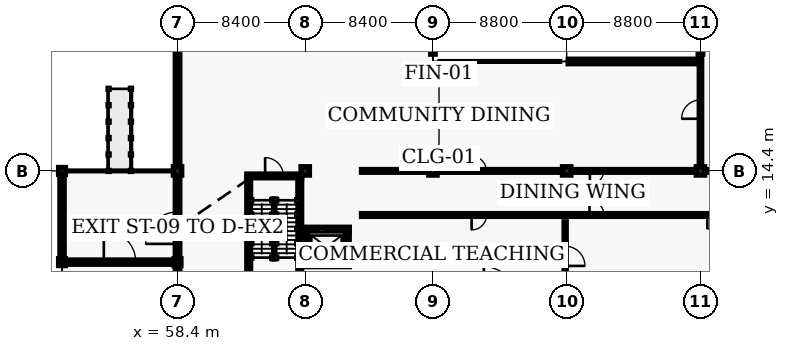
"""IFC4 building model, lengths in metres.
Left out: names, types, materials, properties, quantities, classifications, styles, units other than length and angle.
Written with IfcOpenShell. Run it as: python <this file> out.ifc"""

import sys

from ifc_helpers import new_model, si_unit, direction, frame, frame_2d, origin, origin_2d, place, context, subcontext, project, spatial, rectangle, extrude, element, fill, save


model = new_model("IFC4")
c1 = context("Model", 3, precision=1e-05, world=origin(), true_north=direction((0.0, 1.0)))
c2 = subcontext(c1, "Body", "Model", "MODEL_VIEW")
j1 = project(units=[si_unit("LENGTHUNIT", "METRE"), si_unit("PLANEANGLEUNIT", "RADIAN")], contexts=[c1])
p1 = place(None, origin())
s1 = spatial("IfcSite", under=j1, at=p1, CompositionType="ELEMENT")
p2 = place(p1, origin())
s2 = spatial("IfcBuilding", under=s1, at=p2, CompositionType="ELEMENT")
p3 = place(p2, origin())
s3 = spatial("IfcBuildingStorey", under=s2, at=p3, CompositionType="ELEMENT", Elevation=0.0)
for number, where, z_axis, x_axis in (
    (1, (58.4, 14.4, 0.0), (0.0, 0.0, 1.0), (1.0, 0.0, 0.0)),
    (2, (66.8, 14.4, 0.0), (0.0, 0.0, 1.0), (1.0, 0.0, 0.0)),
    (3, (75.2, 14.4, 0.0), (0.0, 0.0, 1.0), (1.0, 0.0, 0.0)),
    (4, (84.0, 14.4, 0.0), (0.0, 0.0, 1.0), (1.0, 0.0, 0.0)),
    (5, (92.8, 14.4, 0.0), (0.0, 0.0, 1.0), (1.0, 0.0, 0.0)),
):
    element("IfcColumn", number, at=place(p3, frame(where, z_axis=z_axis, x_axis=x_axis)), inside=s3, PredefinedType="COLUMN", context=c2, shape_type="SweptSolid", body=[
        extrude(rectangle(XDim=0.55, YDim=0.55, at=origin_2d()), origin(), (0.0, 0.0, 1.0), 4.8),
    ])
for number, where, z_axis, x_axis in (
    (6, (50.8, 8.4, 0.0), (0.0, 0.0, 1.0), (1.0, 0.0, 0.0)),
    (7, (50.8, 14.4, 0.0), (0.0, 0.0, 1.0), (1.0, 0.0, 0.0)),
    (8, (58.4, 8.4, 0.0), (0.0, 0.0, 1.0), (1.0, 0.0, 0.0)),
):
    element("IfcColumn", number, at=place(p3, frame(where, z_axis=z_axis, x_axis=x_axis)), inside=s3, PredefinedType="COLUMN", context=c2, shape_type="SweptSolid", body=[
        extrude(rectangle(XDim=0.45, YDim=0.45, at=origin_2d()), origin(), (0.0, 0.0, 1.0), 4.8),
    ])
p4 = place(p3, frame((84.1, 21.6, 0.0), z_axis=(0.0, 0.0, 1.0), x_axis=(1.0, 0.0, 0.0)))
e9 = element("IfcWall", 9, at=p4, inside=s3, PredefinedType="SOLIDWALL", context=c2, shape_type="SweptSolid", body=[
    extrude(rectangle(XDim=8.6, YDim=0.3, at=frame_2d((4.3, 0.0))), origin(), (0.0, 0.0, 1.0), 4.35),
])
p5 = place(p4, frame((3.1, 0.0, 0.9)))
e10 = element("IfcOpeningElement", 10, at=p5, cuts=e9, PredefinedType="OPENING", context=c2, shape_type="SweptSolid", body=[
    extrude(rectangle(XDim=2.4, YDim=2.1, at=frame_2d((1.2, 1.05))), frame((0.0, 0.16, 0.0), z_axis=(0.0, -1.0, 0.0), x_axis=(1.0, 0.0, 0.0)), (0.0, 0.0, 1.0), 0.32),
])
p6 = place(p3, frame((58.4, 6.1, 0.0), z_axis=(0.0, 0.0, 1.0), x_axis=(0.0, 1.0, 0.0)))
e11 = element("IfcWall", 11, at=p6, inside=s3, PredefinedType="SOLIDWALL", context=c2, shape_type="SweptSolid", body=[
    extrude(rectangle(XDim=8.2, YDim=0.3, at=frame_2d((4.1, 0.0))), origin(), (0.0, 0.0, 1.0), 4.095),
])
p7 = place(p6, frame((3.5, 0.0, 0.0)))
e12 = element("IfcOpeningElement", 12, at=p7, cuts=e11, PredefinedType="OPENING", context=c2, shape_type="SweptSolid", body=[
    extrude(rectangle(XDim=2.1, YDim=2.35, at=frame_2d((1.05, 1.175))), frame((0.0, 0.16, 0.0), z_axis=(0.0, -1.0, 0.0), x_axis=(1.0, 0.0, 0.0)), (0.0, 0.0, 1.0), 0.32),
])
p8 = place(p3, frame((58.4, 14.5, 0.0), z_axis=(0.0, 0.0, 1.0), x_axis=(0.0, 1.0, 0.0)))
e13 = element("IfcWall", 13, at=p8, inside=s3, PredefinedType="SOLIDWALL", context=c2, shape_type="SweptSolid", body=[
    extrude(rectangle(XDim=8.2, YDim=0.3, at=frame_2d((4.1, 0.0))), origin(), (0.0, 0.0, 1.0), 4.095),
])
p9 = place(p3, frame((50.95, 8.4, 0.0), z_axis=(0.0, 0.0, 1.0), x_axis=(1.0, 0.0, 0.0)))
e14 = element("IfcWall", 14, at=p9, inside=s3, PredefinedType="SOLIDWALL", context=c2, shape_type="SweptSolid", body=[
    extrude(rectangle(XDim=7.3, YDim=0.28, at=frame_2d((3.65, 0.0))), origin(), (0.0, 0.0, 1.0), 4.187),
])
p10 = place(p9, frame((2.6, 0.0, 0.0)))
e15 = element("IfcOpeningElement", 15, at=p10, cuts=e14, PredefinedType="OPENING", context=c2, shape_type="SweptSolid", body=[
    extrude(rectangle(XDim=2.1, YDim=2.35, at=frame_2d((1.05, 1.175))), frame((0.0, 0.15, 0.0), z_axis=(0.0, -1.0, 0.0), x_axis=(1.0, 0.0, 0.0)), (0.0, 0.0, 1.0), 0.3),
])
p11 = place(p3, frame((50.8, 8.45, 0.0), z_axis=(0.0, 0.0, 1.0), x_axis=(0.0, 1.0, 0.0)))
e16 = element("IfcWall", 16, at=p11, inside=s3, PredefinedType="SOLIDWALL", context=c2, shape_type="SweptSolid", body=[
    extrude(rectangle(XDim=5.8, YDim=0.28, at=frame_2d((2.9, 0.0))), origin(), (0.0, 0.0, 1.0), 4.135),
])
for number, where, z_axis, x_axis in (
    (17, (75.2, 22.08, 0.0), (0.0, 0.0, 1.0), (0.0, 1.0, 0.0)),
    (18, (92.8, 22.08, 0.0), (0.0, 0.0, 1.0), (0.0, 1.0, 0.0)),
):
    element("IfcWall", number, at=place(p3, frame(where, z_axis=z_axis, x_axis=x_axis)), inside=s3, PredefinedType="SOLIDWALL", context=c2, shape_type="SweptSolid", body=[
        extrude(rectangle(XDim=0.77, YDim=0.3, at=frame_2d((0.385, 0.0))), origin(), (0.0, 0.0, 1.0), 3.845),
    ])
p12 = place(p3, frame((62.955, 14.07, 0.0), z_axis=(0.0, 0.0, 1.0), x_axis=(1.0, 0.0, 0.0)))
e19 = element("IfcWall", 19, at=p12, inside=s3, PredefinedType="SHEAR", context=c2, shape_type="SweptSolid", body=[
    extrude(rectangle(XDim=3.61, YDim=0.25, at=frame_2d((1.805, 0.0))), origin(), (0.0, 0.0, 1.0), 4.56),
])
p13 = place(p12, frame((1.205, 0.0, 0.0)))
e20 = element("IfcOpeningElement", 20, at=p13, cuts=e19, PredefinedType="OPENING", context=c2, shape_type="SweptSolid", body=[
    extrude(rectangle(XDim=1.2, YDim=2.15, at=frame_2d((0.6, 1.075))), frame((0.0, 0.135, 0.0), z_axis=(0.0, -1.0, 0.0), x_axis=(1.0, 0.0, 0.0)), (0.0, 0.0, 1.0), 0.27),
])
for number, where, z_axis, x_axis in (
    (21, (66.44, 13.945, 0.0), (0.0, 0.0, 1.0), (0.0, -1.0, 0.0)),
    (22, (63.08, 6.555, 0.0), (0.0, 0.0, 1.0), (0.0, 1.0, 0.0)),
):
    element("IfcWall", number, at=place(p3, frame(where, z_axis=z_axis, x_axis=x_axis)), inside=s3, PredefinedType="SHEAR", context=c2, shape_type="SweptSolid", body=[
        extrude(rectangle(XDim=7.39, YDim=0.25, at=frame_2d((3.695, 0.0))), origin(), (0.0, 0.0, 1.0), 4.56),
    ])
p14 = place(p3, frame((66.7, 8.23, 0.0), z_axis=(0.0, 0.0, 1.0), x_axis=(1.0, 0.0, 0.0)))
e23 = element("IfcWall", 23, at=p14, inside=s3, PredefinedType="SHEAR", context=c2, shape_type="SweptSolid", body=[
    extrude(rectangle(XDim=3.0, YDim=0.25, at=frame_2d((1.5, 0.0))), origin(), (0.0, 0.0, 1.0), 4.56),
])
p15 = place(p3, frame((69.7, 10.57, 0.0), z_axis=(0.0, 0.0, 1.0), x_axis=(-1.0, 0.0, 0.0)))
e24 = element("IfcWall", 24, at=p15, inside=s3, PredefinedType="SHEAR", context=c2, shape_type="SweptSolid", body=[
    extrude(rectangle(XDim=3.0, YDim=0.25, at=frame_2d((1.5, 0.0))), origin(), (0.0, 0.0, 1.0), 4.56),
])
p16 = place(p15, frame((0.95, 0.0, 0.0)))
e25 = element("IfcOpeningElement", 25, at=p16, cuts=e24, PredefinedType="OPENING", context=c2, shape_type="SweptSolid", body=[
    extrude(rectangle(XDim=1.1, YDim=2.15, at=frame_2d((0.55, 1.075))), frame((0.0, 0.135, 0.0), z_axis=(0.0, -1.0, 0.0), x_axis=(1.0, 0.0, 0.0)), (0.0, 0.0, 1.0), 0.27),
])
for number, where, z_axis, x_axis in (
    (26, (69.57, 8.36, 0.0), (0.0, 0.0, 1.0), (0.0, 1.0, 0.0)),
    (27, (66.83, 10.44, 0.0), (0.0, 0.0, 1.0), (0.0, -1.0, 0.0)),
):
    element("IfcWall", number, at=place(p3, frame(where, z_axis=z_axis, x_axis=x_axis)), inside=s3, PredefinedType="SHEAR", context=c2, shape_type="SweptSolid", body=[
        extrude(rectangle(XDim=2.08, YDim=0.25, at=frame_2d((1.04, 0.0))), origin(), (0.0, 0.0, 1.0), 4.56),
    ])
p17 = place(p3, frame((70.5, 11.5, 0.0), z_axis=(0.0, 0.0, 1.0), x_axis=(1.0, 0.0, 0.0)))
e28 = element("IfcWall", 28, at=p17, inside=s3, PredefinedType="PARTITIONING", context=c2, shape_type="SweptSolid", body=[
    extrude(rectangle(XDim=30.95, YDim=0.18, at=frame_2d((15.475, 0.0))), origin(), (0.0, 0.0, 1.0), 3.845),
])
p18 = place(p17, frame((7.247, 0.0, 0.0)))
e29 = element("IfcOpeningElement", 29, at=p18, cuts=e28, PredefinedType="OPENING", context=c2, shape_type="SweptSolid", body=[
    extrude(rectangle(XDim=0.98, YDim=2.12, at=frame_2d((0.49, 1.06))), frame((0.0, 0.1, 0.0), z_axis=(0.0, -1.0, 0.0), x_axis=(1.0, 0.0, 0.0)), (0.0, 0.0, 1.0), 0.2),
])
p19 = place(p17, frame((15.0, 0.0, 0.0)))
e30 = element("IfcOpeningElement", 30, at=p19, cuts=e28, PredefinedType="OPENING", context=c2, shape_type="SweptSolid", body=[
    extrude(rectangle(XDim=0.95, YDim=2.12, at=frame_2d((0.475, 1.06))), frame((0.0, 0.1, 0.0), z_axis=(0.0, -1.0, 0.0), x_axis=(1.0, 0.0, 0.0)), (0.0, 0.0, 1.0), 0.2),
])
p20 = place(p17, frame((22.753, 0.0, 0.0)))
e31 = element("IfcOpeningElement", 31, at=p20, cuts=e28, PredefinedType="OPENING", context=c2, shape_type="SweptSolid", body=[
    extrude(rectangle(XDim=0.92, YDim=2.1, at=frame_2d((0.46, 1.05))), frame((0.0, 0.1, 0.0), z_axis=(0.0, -1.0, 0.0), x_axis=(1.0, 0.0, 0.0)), (0.0, 0.0, 1.0), 0.2),
])
p21 = place(p17, frame((27.292, 0.0, 0.0)))
e32 = element("IfcOpeningElement", 32, at=p21, cuts=e28, PredefinedType="OPENING", context=c2, shape_type="SweptSolid", body=[
    extrude(rectangle(XDim=0.9, YDim=2.06, at=frame_2d((0.45, 1.03))), frame((0.0, 0.1, 0.0), z_axis=(0.0, -1.0, 0.0), x_axis=(1.0, 0.0, 0.0)), (0.0, 0.0, 1.0), 0.2),
])
p22 = place(p3, frame((70.5, 14.4, 0.0), z_axis=(0.0, 0.0, 1.0), x_axis=(1.0, 0.0, 0.0)))
e33 = element("IfcWall", 33, at=p22, inside=s3, PredefinedType="PARTITIONING", context=c2, shape_type="SweptSolid", body=[
    extrude(rectangle(XDim=30.95, YDim=0.18, at=frame_2d((15.475, 0.0))), origin(), (0.0, 0.0, 1.0), 3.795),
])
p23 = place(p22, frame((7.257, 0.0, 0.0)))
e34 = element("IfcOpeningElement", 34, at=p23, cuts=e33, PredefinedType="OPENING", context=c2, shape_type="SweptSolid", body=[
    extrude(rectangle(XDim=0.96, YDim=2.08, at=frame_2d((0.48, 1.04))), frame((0.0, 0.1, 0.0), z_axis=(0.0, -1.0, 0.0), x_axis=(1.0, 0.0, 0.0)), (0.0, 0.0, 1.0), 0.2),
])
p24 = place(p22, frame((15.025, 0.0, 0.0)))
e35 = element("IfcOpeningElement", 35, at=p24, cuts=e33, PredefinedType="OPENING", context=c2, shape_type="SweptSolid", body=[
    extrude(rectangle(XDim=0.9, YDim=2.06, at=frame_2d((0.45, 1.03))), frame((0.0, 0.1, 0.0), z_axis=(0.0, -1.0, 0.0), x_axis=(1.0, 0.0, 0.0)), (0.0, 0.0, 1.0), 0.2),
])
p25 = place(p22, frame((23.523, 0.0, 0.0)))
e36 = element("IfcOpeningElement", 36, at=p25, cuts=e33, PredefinedType="OPENING", context=c2, shape_type="SweptSolid", body=[
    extrude(rectangle(XDim=1.18, YDim=2.18, at=frame_2d((0.59, 1.09))), frame((0.0, 0.1, 0.0), z_axis=(0.0, -1.0, 0.0), x_axis=(1.0, 0.0, 0.0)), (0.0, 0.0, 1.0), 0.2),
])
p26 = place(p3, frame((83.9, 6.55, 0.0), z_axis=(0.0, 0.0, 1.0), x_axis=(0.0, 1.0, 0.0)))
e37 = element("IfcWall", 37, at=p26, inside=s3, PredefinedType="PARTITIONING", context=c2, shape_type="SweptSolid", body=[
    extrude(rectangle(XDim=4.5, YDim=0.14, at=frame_2d((2.25, 0.0))), origin(), (0.0, 0.0, 1.0), 3.845),
])
p27 = place(p26, frame((1.6, 0.0, 0.0)))
e38 = element("IfcOpeningElement", 38, at=p27, cuts=e37, PredefinedType="OPENING", context=c2, shape_type="SweptSolid", body=[
    extrude(rectangle(XDim=1.3, YDim=2.2, at=frame_2d((0.65, 1.1))), frame((0.0, 0.08, 0.0), z_axis=(0.0, -1.0, 0.0), x_axis=(1.0, 0.0, 0.0)), (0.0, 0.0, 1.0), 0.16),
])
p28 = place(p3, frame((92.8, 14.85, 0.0), z_axis=(0.0, 0.0, 1.0), x_axis=(0.0, 1.0, 0.0)))
e39 = element("IfcWall", 39, at=p28, inside=s3, PredefinedType="PARTITIONING", context=c2, shape_type="SweptSolid", body=[
    extrude(rectangle(XDim=7.2, YDim=0.16, at=frame_2d((3.6, 0.0))), origin(), (0.0, 0.0, 1.0), 3.845),
])
p29 = place(p28, frame((2.98, 0.0, 0.0)))
e40 = element("IfcOpeningElement", 40, at=p29, cuts=e39, PredefinedType="OPENING", context=c2, shape_type="SweptSolid", body=[
    extrude(rectangle(XDim=1.24, YDim=2.2, at=frame_2d((0.62, 1.1))), frame((0.0, 0.09, 0.0), z_axis=(0.0, -1.0, 0.0), x_axis=(1.0, 0.0, 0.0)), (0.0, 0.0, 1.0), 0.18),
])
p30 = place(p5, origin())
e41 = element("IfcWindow", 41, at=p30, inside=s3, PartitioningType="SINGLE_PANEL", PredefinedType="WINDOW", context=c2, shape_type="SweptSolid", body=[
    extrude(rectangle(XDim=2.4, YDim=2.1, at=frame_2d((1.2, 1.05))), frame((0.0, 0.03, 0.0), z_axis=(0.0, -1.0, 0.0), x_axis=(1.0, 0.0, 0.0)), (0.0, 0.0, 1.0), 0.06),
])
fill(e10, e41)
p31 = place(p13, origin())
e42 = element("IfcDoor", 42, at=p31, inside=s3, OperationType="SINGLE_SWING_LEFT", PredefinedType="DOOR", context=c2, shape_type="SweptSolid", body=[
    extrude(rectangle(XDim=1.2, YDim=2.15, at=frame_2d((0.6, 1.075))), frame((0.0, 0.025, 0.0), z_axis=(0.0, -1.0, 0.0), x_axis=(1.0, 0.0, 0.0)), (0.0, 0.0, 1.0), 0.05),
])
fill(e20, e42)
p32 = place(p16, origin())
e43 = element("IfcDoor", 43, at=p32, inside=s3, OperationType="SLIDING_TO_LEFT", PredefinedType="DOOR", context=c2, shape_type="SweptSolid", body=[
    extrude(rectangle(XDim=1.1, YDim=2.15, at=frame_2d((0.55, 1.075))), frame((0.0, 0.025, 0.0), z_axis=(0.0, -1.0, 0.0), x_axis=(1.0, 0.0, 0.0)), (0.0, 0.0, 1.0), 0.05),
])
fill(e25, e43)
p33 = place(p7, origin())
e44 = element("IfcDoor", 44, at=p33, inside=s3, OperationType="DOUBLE_DOOR_SINGLE_SWING", PredefinedType="DOOR", context=c2, shape_type="SweptSolid", body=[
    extrude(rectangle(XDim=2.1, YDim=2.35, at=frame_2d((1.05, 1.175))), frame((0.0, 0.025, 0.0), z_axis=(0.0, -1.0, 0.0), x_axis=(1.0, 0.0, 0.0)), (0.0, 0.0, 1.0), 0.05),
])
fill(e12, e44)
p34 = place(p10, origin())
e45 = element("IfcDoor", 45, at=p34, inside=s3, OperationType="DOUBLE_DOOR_SINGLE_SWING", PredefinedType="DOOR", context=c2, shape_type="SweptSolid", body=[
    extrude(rectangle(XDim=2.1, YDim=2.35, at=frame_2d((1.05, 1.175))), frame((0.0, 0.025, 0.0), z_axis=(0.0, -1.0, 0.0), x_axis=(1.0, 0.0, 0.0)), (0.0, 0.0, 1.0), 0.05),
])
fill(e15, e45)
p35 = place(p18, origin())
e46 = element("IfcDoor", 46, at=p35, inside=s3, OperationType="SINGLE_SWING_RIGHT", PredefinedType="DOOR", context=c2, shape_type="SweptSolid", body=[
    extrude(rectangle(XDim=0.98, YDim=2.12, at=frame_2d((0.49, 1.06))), frame((0.0, 0.025, 0.0), z_axis=(0.0, -1.0, 0.0), x_axis=(1.0, 0.0, 0.0)), (0.0, 0.0, 1.0), 0.05),
])
fill(e29, e46)
p36 = place(p19, origin())
e47 = element("IfcDoor", 47, at=p36, inside=s3, OperationType="SINGLE_SWING_LEFT", PredefinedType="DOOR", context=c2, shape_type="SweptSolid", body=[
    extrude(rectangle(XDim=0.95, YDim=2.12, at=frame_2d((0.475, 1.06))), frame((0.0, 0.025, 0.0), z_axis=(0.0, -1.0, 0.0), x_axis=(1.0, 0.0, 0.0)), (0.0, 0.0, 1.0), 0.05),
])
fill(e30, e47)
p37 = place(p20, origin())
e48 = element("IfcDoor", 48, at=p37, inside=s3, OperationType="SINGLE_SWING_RIGHT", PredefinedType="DOOR", context=c2, shape_type="SweptSolid", body=[
    extrude(rectangle(XDim=0.92, YDim=2.1, at=frame_2d((0.46, 1.05))), frame((0.0, 0.025, 0.0), z_axis=(0.0, -1.0, 0.0), x_axis=(1.0, 0.0, 0.0)), (0.0, 0.0, 1.0), 0.05),
])
fill(e31, e48)
p38 = place(p23, origin())
e49 = element("IfcDoor", 49, at=p38, inside=s3, OperationType="SINGLE_SWING_LEFT", PredefinedType="DOOR", context=c2, shape_type="SweptSolid", body=[
    extrude(rectangle(XDim=0.96, YDim=2.08, at=frame_2d((0.48, 1.04))), frame((0.0, 0.025, 0.0), z_axis=(0.0, -1.0, 0.0), x_axis=(1.0, 0.0, 0.0)), (0.0, 0.0, 1.0), 0.05),
])
fill(e34, e49)
p39 = place(p24, origin())
e50 = element("IfcDoor", 50, at=p39, inside=s3, OperationType="SINGLE_SWING_RIGHT", PredefinedType="DOOR", context=c2, shape_type="SweptSolid", body=[
    extrude(rectangle(XDim=0.9, YDim=2.06, at=frame_2d((0.45, 1.03))), frame((0.0, 0.025, 0.0), z_axis=(0.0, -1.0, 0.0), x_axis=(1.0, 0.0, 0.0)), (0.0, 0.0, 1.0), 0.05),
])
fill(e35, e50)
p40 = place(p27, origin())
e51 = element("IfcDoor", 51, at=p40, inside=s3, OperationType="SINGLE_SWING_RIGHT", PredefinedType="DOOR", context=c2, shape_type="SweptSolid", body=[
    extrude(rectangle(XDim=1.3, YDim=2.2, at=frame_2d((0.65, 1.1))), frame((0.0, 0.025, 0.0), z_axis=(0.0, -1.0, 0.0), x_axis=(1.0, 0.0, 0.0)), (0.0, 0.0, 1.0), 0.05),
])
fill(e38, e51)
p41 = place(p29, origin())
e52 = element("IfcDoor", 52, at=p41, inside=s3, OperationType="SINGLE_SWING_LEFT", PredefinedType="DOOR", context=c2, shape_type="SweptSolid", body=[
    extrude(rectangle(XDim=1.24, YDim=2.2, at=frame_2d((0.62, 1.1))), frame((0.0, 0.025, 0.0), z_axis=(0.0, -1.0, 0.0), x_axis=(1.0, 0.0, 0.0)), (0.0, 0.0, 1.0), 0.05),
])
fill(e40, e52)
save(model, sys.argv[1])
